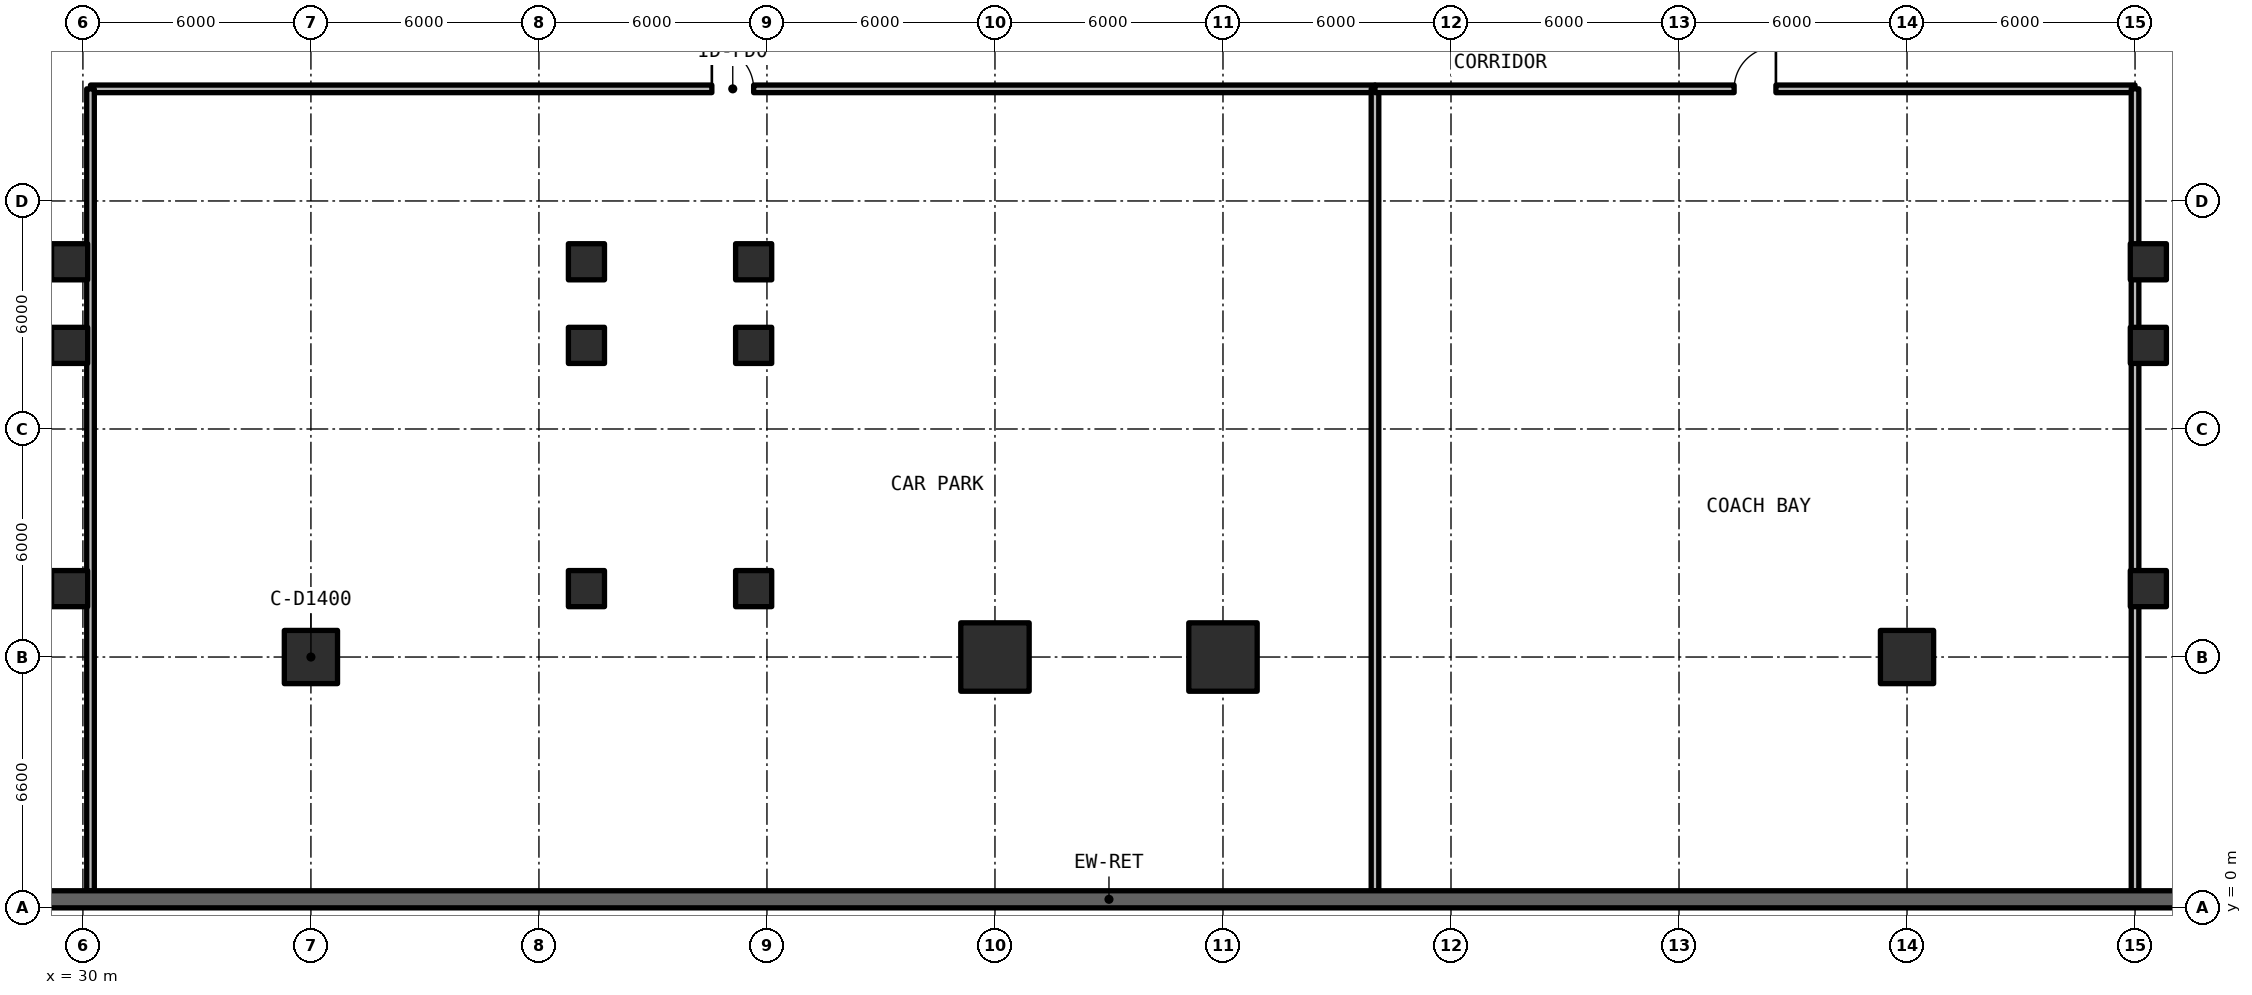
"""IFC4 building model, lengths in metres.
Left out: names, types, materials, properties, quantities, classifications, styles, units other than length and angle.
Written with IfcOpenShell. Run it as: python <this file> out.ifc"""

import sys

from ifc_helpers import new_model, si_unit, direction, frame, frame_2d, origin, origin_2d, place, context, subcontext, project, spatial, rectangle, circle, extrude, element, fill, save


model = new_model("IFC4")
c1 = context("Model", 3, precision=1e-05, world=origin(), true_north=direction((0.0, 1.0)))
c2 = subcontext(c1, "Body", "Model", "MODEL_VIEW")
j1 = project(units=[si_unit("LENGTHUNIT", "METRE"), si_unit("PLANEANGLEUNIT", "RADIAN")], contexts=[c1])
p1 = place(None, origin())
s1 = spatial("IfcSite", under=j1, at=p1, CompositionType="ELEMENT")
p2 = place(p1, origin())
s2 = spatial("IfcBuilding", under=s1, at=p2, CompositionType="ELEMENT")
p3 = place(p2, frame((0.0, 0.0, -4.62)))
s3 = spatial("IfcBuildingStorey", under=s2, at=p3, CompositionType="ELEMENT", Elevation=-4.62)
p4 = place(p3, frame((36.0, 6.6, 0.0), z_axis=(0.0, 0.0, 1.0), x_axis=(1.0, 0.0, 0.0)))
e1 = element("IfcColumn", 1, at=p4, inside=s3, PredefinedType="COLUMN", context=c2, shape_type="SweptSolid", body=[
    extrude(circle(Radius=0.7, at=origin_2d()), origin(), (0.0, 0.0, 1.0), 4.62),
])
for number, where, z_axis, x_axis in (
    (2, (54.0, 6.6, 0.0), (0.0, 0.0, 1.0), (1.0, 0.0, 0.0)),
    (3, (60.0, 6.6, 0.0), (0.0, 0.0, 1.0), (1.0, 0.0, 0.0)),
):
    element("IfcColumn", number, at=place(p3, frame(where, z_axis=z_axis, x_axis=x_axis)), inside=s3, PredefinedType="COLUMN", context=c2, shape_type="SweptSolid", body=[
        extrude(rectangle(XDim=1.8, YDim=1.8, at=origin_2d()), origin(), (0.0, 0.0, 1.0), 4.62),
    ])
p5 = place(p3, frame((78.0, 6.6, 0.0), z_axis=(0.0, 0.0, 1.0), x_axis=(1.0, 0.0, 0.0)))
e4 = element("IfcColumn", 4, at=p5, inside=s3, PredefinedType="COLUMN", context=c2, shape_type="SweptSolid", body=[
    extrude(circle(Radius=0.7, at=origin_2d()), origin(), (0.0, 0.0, 1.0), 4.62),
])
for number, where, z_axis, x_axis in (
    (5, (29.65, 14.8, 0.0), (0.0, 0.0, 1.0), (1.0, 0.0, 0.0)),
    (6, (29.65, 8.4, 0.0), (0.0, 0.0, 1.0), (1.0, 0.0, 0.0)),
    (7, (29.65, 17.0, 0.0), (0.0, 0.0, 1.0), (1.0, 0.0, 0.0)),
    (8, (43.25, 14.8, 0.0), (0.0, 0.0, 1.0), (1.0, 0.0, 0.0)),
    (9, (47.65, 14.8, 0.0), (0.0, 0.0, 1.0), (1.0, 0.0, 0.0)),
    (10, (43.25, 8.4, 0.0), (0.0, 0.0, 1.0), (1.0, 0.0, 0.0)),
    (11, (47.65, 8.4, 0.0), (0.0, 0.0, 1.0), (1.0, 0.0, 0.0)),
    (12, (47.65, 17.0, 0.0), (0.0, 0.0, 1.0), (1.0, 0.0, 0.0)),
    (13, (43.25, 17.0, 0.0), (0.0, 0.0, 1.0), (1.0, 0.0, 0.0)),
    (14, (84.35, 14.8, 0.0), (0.0, 0.0, 1.0), (1.0, 0.0, 0.0)),
    (15, (84.35, 8.4, 0.0), (0.0, 0.0, 1.0), (1.0, 0.0, 0.0)),
    (16, (84.35, 17.0, 0.0), (0.0, 0.0, 1.0), (1.0, 0.0, 0.0)),
):
    element("IfcColumn", number, at=place(p3, frame(where, z_axis=z_axis, x_axis=x_axis)), inside=s3, PredefinedType="COLUMN", context=c2, shape_type="SweptSolid", body=[
        extrude(rectangle(XDim=0.95, YDim=0.95, at=origin_2d()), origin(), (0.0, 0.0, 1.0), 4.34),
    ])
p6 = place(p3, frame((0.225, 0.225, 0.0), z_axis=(0.0, 0.0, 1.0), x_axis=(1.0, 0.0, 0.0)))
e17 = element("IfcWall", 17, at=p6, inside=s3, PredefinedType="USERDEFINED", context=c2, shape_type="SweptSolid", body=[
    extrude(rectangle(XDim=113.55, YDim=0.45, at=frame_2d((56.775, 0.0))), origin(), (0.0, 0.0, 1.0), 4.34),
])
p7 = place(p3, frame((30.2, 21.55, 0.0), z_axis=(0.0, 0.0, 1.0), x_axis=(1.0, 0.0, 0.0)))
e18 = element("IfcWall", 18, at=p7, inside=s3, PredefinedType="SOLIDWALL", context=c2, shape_type="SweptSolid", body=[
    extrude(rectangle(XDim=33.8, YDim=0.2, at=frame_2d((16.9, 0.0))), origin(), (0.0, 0.0, 1.0), 3.56),
])
p8 = place(p7, frame((16.35, 0.0, 0.0)))
e19 = element("IfcOpeningElement", 19, at=p8, cuts=e18, PredefinedType="OPENING", context=c2, shape_type="SweptSolid", body=[
    extrude(rectangle(XDim=1.1, YDim=2.15, at=frame_2d((0.55, 1.075))), frame((0.0, 0.11, 0.0), z_axis=(0.0, -1.0, 0.0), x_axis=(1.0, 0.0, 0.0)), (0.0, 0.0, 1.0), 0.22),
])
for number, where, z_axis, x_axis in (
    (20, (30.2, 0.45, 0.0), (0.0, 0.0, 1.0), (0.0, 1.0, 0.0)),
    (21, (64.0, 0.45, 0.0), (0.0, 0.0, 1.0), (0.0, 1.0, 0.0)),
):
    element("IfcWall", number, at=place(p3, frame(where, z_axis=z_axis, x_axis=x_axis)), inside=s3, PredefinedType="SOLIDWALL", context=c2, shape_type="SweptSolid", body=[
        extrude(rectangle(XDim=21.1, YDim=0.2, at=frame_2d((10.55, 0.0))), origin(), (0.0, 0.0, 1.0), 3.56),
    ])
p9 = place(p3, frame((64.0, 21.55, 0.0), z_axis=(0.0, 0.0, 1.0), x_axis=(1.0, 0.0, 0.0)))
e22 = element("IfcWall", 22, at=p9, inside=s3, PredefinedType="SOLIDWALL", context=c2, shape_type="SweptSolid", body=[
    extrude(rectangle(XDim=20.0, YDim=0.2, at=frame_2d((10.0, 0.0))), origin(), (0.0, 0.0, 1.0), 3.56),
])
p10 = place(p9, frame((9.45, 0.0, 0.0)))
e23 = element("IfcOpeningElement", 23, at=p10, cuts=e22, PredefinedType="OPENING", context=c2, shape_type="SweptSolid", body=[
    extrude(rectangle(XDim=1.1, YDim=2.15, at=frame_2d((0.55, 1.075))), frame((0.0, 0.11, 0.0), z_axis=(0.0, -1.0, 0.0), x_axis=(1.0, 0.0, 0.0)), (0.0, 0.0, 1.0), 0.22),
])
p11 = place(p3, frame((84.0, 0.45, 0.0), z_axis=(0.0, 0.0, 1.0), x_axis=(0.0, 1.0, 0.0)))
e24 = element("IfcWall", 24, at=p11, inside=s3, PredefinedType="SOLIDWALL", context=c2, shape_type="SweptSolid", body=[
    extrude(rectangle(XDim=21.1, YDim=0.2, at=frame_2d((10.55, 0.0))), origin(), (0.0, 0.0, 1.0), 3.56),
])
p12 = place(p8, origin())
e25 = element("IfcDoor", 25, at=p12, inside=s3, OperationType="SINGLE_SWING_LEFT", PredefinedType="DOOR", context=c2, shape_type="SweptSolid", body=[
    extrude(rectangle(XDim=1.1, YDim=2.15, at=frame_2d((0.55, 1.075))), frame((0.0, 0.025, 0.0), z_axis=(0.0, -1.0, 0.0), x_axis=(1.0, 0.0, 0.0)), (0.0, 0.0, 1.0), 0.05),
])
fill(e19, e25)
p13 = place(p10, origin())
e26 = element("IfcDoor", 26, at=p13, inside=s3, OperationType="SINGLE_SWING_RIGHT", PredefinedType="DOOR", context=c2, shape_type="SweptSolid", body=[
    extrude(rectangle(XDim=1.1, YDim=2.15, at=frame_2d((0.55, 1.075))), frame((0.0, 0.025, 0.0), z_axis=(0.0, -1.0, 0.0), x_axis=(1.0, 0.0, 0.0)), (0.0, 0.0, 1.0), 0.05),
])
fill(e23, e26)
save(model, sys.argv[1])
